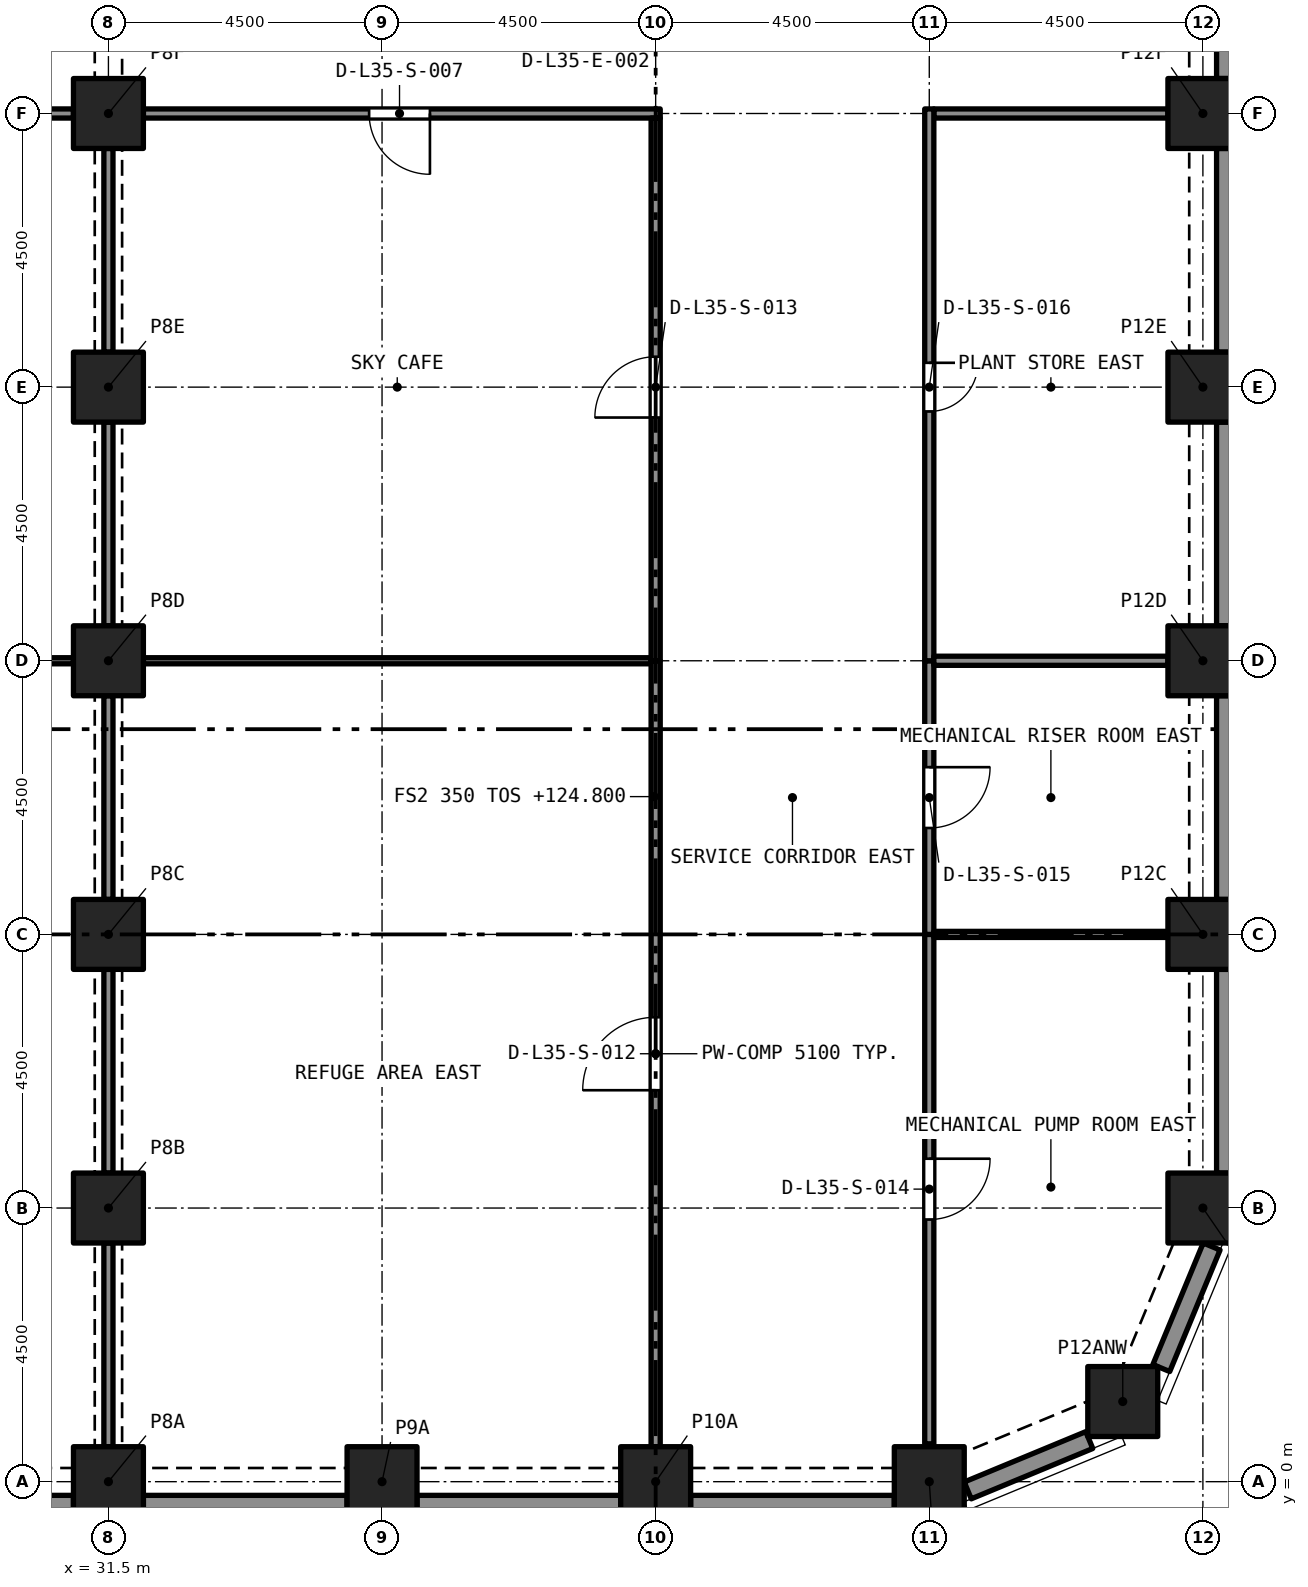
"""IFC4 building model, lengths in metres.
Left out: names, types, materials, properties, quantities, classifications, styles, units other than length and angle.
Written with IfcOpenShell. Run it as: python <this file> out.ifc"""

import sys

from ifc_helpers import new_model, si_unit, direction, frame, frame_2d, origin, origin_2d, place, context, subcontext, project, spatial, rectangle, extrude, element, fill, save


model = new_model("IFC4")
c1 = context("Model", 3, precision=1e-05, world=origin(), true_north=direction((0.0, 1.0)))
c2 = subcontext(c1, "Body", "Model", "MODEL_VIEW")
j1 = project(units=[si_unit("LENGTHUNIT", "METRE"), si_unit("PLANEANGLEUNIT", "RADIAN")], contexts=[c1])
p1 = place(None, origin())
s1 = spatial("IfcSite", under=j1, at=p1, CompositionType="ELEMENT")
p2 = place(p1, origin())
s2 = spatial("IfcBuilding", under=s1, at=p2, CompositionType="ELEMENT")
p3 = place(p2, frame((0.0, 0.0, 124.8)))
s3 = spatial("IfcBuildingStorey", under=s2, at=p3, CompositionType="ELEMENT", Elevation=124.8)
for number, where, z_axis, x_axis in (
    (1, (31.5, 0.0, 0.0), (0.0, 0.0, 1.0), (1.0, 0.0, 0.0)),
    (2, (36.0, 0.0, 0.0), (0.0, 0.0, 1.0), (1.0, 0.0, 0.0)),
    (3, (40.5, 0.0, 0.0), (0.0, 0.0, 1.0), (1.0, 0.0, 0.0)),
    (4, (45.0, 0.0, 0.0), (0.0, 0.0, 1.0), (1.0, 0.0, 0.0)),
    (5, (48.182, 1.318, 0.0), (0.0, 0.0, 1.0), (1.0, 0.0, 0.0)),
    (6, (31.5, 4.5, 0.0), (0.0, 0.0, 1.0), (1.0, 0.0, 0.0)),
    (7, (49.5, 4.5, 0.0), (0.0, 0.0, 1.0), (1.0, 0.0, 0.0)),
    (8, (31.5, 9.0, 0.0), (0.0, 0.0, 1.0), (1.0, 0.0, 0.0)),
    (9, (49.5, 9.0, 0.0), (0.0, 0.0, 1.0), (1.0, 0.0, 0.0)),
    (10, (31.5, 13.5, 0.0), (0.0, 0.0, 1.0), (1.0, 0.0, 0.0)),
    (11, (49.5, 13.5, 0.0), (0.0, 0.0, 1.0), (1.0, 0.0, 0.0)),
    (12, (31.5, 18.0, 0.0), (0.0, 0.0, 1.0), (1.0, 0.0, 0.0)),
    (13, (49.5, 18.0, 0.0), (0.0, 0.0, 1.0), (1.0, 0.0, 0.0)),
    (14, (31.5, 22.5, 0.0), (0.0, 0.0, 1.0), (1.0, 0.0, 0.0)),
    (15, (49.5, 22.5, 0.0), (0.0, 0.0, 1.0), (1.0, 0.0, 0.0)),
):
    element("IfcColumn", number, at=place(p3, frame(where, z_axis=z_axis, x_axis=x_axis)), inside=s3, PredefinedType="COLUMN", context=c2, shape_type="SweptSolid", body=[
        extrude(rectangle(XDim=1.15, YDim=1.15, at=origin_2d()), origin(), (0.0, 0.0, 1.0), 5.4),
    ])
for number, where, z_axis, x_axis in (
    (16, (30.925, -0.375, 0.0), (0.0, 0.0, 1.0), (-1.0, 0.0, 0.0)),
    (17, (35.425, -0.375, 0.0), (0.0, 0.0, 1.0), (-1.0, 0.0, 0.0)),
    (18, (39.925, -0.375, 0.0), (0.0, 0.0, 1.0), (-1.0, 0.0, 0.0)),
    (19, (44.425, -0.375, 0.0), (0.0, 0.0, 1.0), (-1.0, 0.0, 0.0)),
):
    element("IfcWall", number, at=place(p3, frame(where, z_axis=z_axis, x_axis=x_axis)), inside=s3, PredefinedType="SOLIDWALL", context=c2, shape_type="SweptSolid", body=[
        extrude(rectangle(XDim=3.35, YDim=0.3, at=frame_2d((1.675, 0.0))), origin(), (0.0, 0.0, 1.0), 5.4),
    ])
for number, where, z_axis, x_axis in (
    (20, (47.631, 0.684, 0.0), (0.0, 0.0, 1.0), (-0.924, -0.383, 0.0)),
    (21, (49.644, 3.868, 0.0), (0.0, 0.0, 1.0), (-0.383, -0.924, 0.0)),
):
    element("IfcWall", number, at=place(p3, frame(where, z_axis=z_axis, x_axis=x_axis)), inside=s3, PredefinedType="SOLIDWALL", context=c2, shape_type="SweptSolid", body=[
        extrude(rectangle(XDim=2.164, YDim=0.3, at=frame_2d((1.082, 0.0))), origin(), (0.0, 0.0, 1.0), 5.4),
    ])
for number, where, z_axis, x_axis in (
    (22, (49.875, 8.425, 0.0), (0.0, 0.0, 1.0), (0.0, -1.0, 0.0)),
    (23, (49.875, 12.925, 0.0), (0.0, 0.0, 1.0), (0.0, -1.0, 0.0)),
    (24, (49.875, 17.425, 0.0), (0.0, 0.0, 1.0), (0.0, -1.0, 0.0)),
    (25, (49.875, 21.925, 0.0), (0.0, 0.0, 1.0), (0.0, -1.0, 0.0)),
    (26, (49.875, 26.425, 0.0), (0.0, 0.0, 1.0), (0.0, -1.0, 0.0)),
):
    element("IfcWall", number, at=place(p3, frame(where, z_axis=z_axis, x_axis=x_axis)), inside=s3, PredefinedType="SOLIDWALL", context=c2, shape_type="SweptSolid", body=[
        extrude(rectangle(XDim=3.35, YDim=0.3, at=frame_2d((1.675, 0.0))), origin(), (0.0, 0.0, 1.0), 5.4),
    ])
p4 = place(p3, frame((30.925, 22.5, 0.0), z_axis=(0.0, 0.0, 1.0), x_axis=(-1.0, 0.0, 0.0)))
e27 = element("IfcWall", 27, at=p4, inside=s3, PredefinedType="PARTITIONING", context=c2, shape_type="SweptSolid", body=[
    extrude(rectangle(XDim=12.35, YDim=0.15, at=frame_2d((6.175, 0.0))), origin(), (0.0, 0.0, 1.0), 4.95),
])
p5 = place(p4, frame((5.425, 0.0, 0.0)))
e28 = element("IfcOpeningElement", 28, at=p5, cuts=e27, PredefinedType="OPENING", context=c2, shape_type="SweptSolid", body=[
    extrude(rectangle(XDim=1.5, YDim=2.4, at=frame_2d((0.75, 1.2))), frame((0.0, 0.085, 0.0), z_axis=(0.0, -1.0, 0.0), x_axis=(1.0, 0.0, 0.0)), (0.0, 0.0, 1.0), 0.17),
])
p6 = place(p3, frame((30.925, 13.5, 0.0), z_axis=(0.0, 0.0, 1.0), x_axis=(-1.0, 0.0, 0.0)))
e29 = element("IfcWall", 29, at=p6, inside=s3, PredefinedType="PARTITIONING", context=c2, shape_type="SweptSolid", body=[
    extrude(rectangle(XDim=12.35, YDim=0.1, at=frame_2d((6.175, 0.0))), origin(), (0.0, 0.0, 1.0), 4.95),
])
p7 = place(p6, frame((5.425, 0.0, 0.0)))
e30 = element("IfcOpeningElement", 30, at=p7, cuts=e29, PredefinedType="OPENING", context=c2, shape_type="SweptSolid", body=[
    extrude(rectangle(XDim=1.5, YDim=2.4, at=frame_2d((0.75, 1.2))), frame((0.0, 0.06, 0.0), z_axis=(0.0, -1.0, 0.0), x_axis=(1.0, 0.0, 0.0)), (0.0, 0.0, 1.0), 0.12),
])
for number, where, z_axis, x_axis in (
    (31, (31.5, 9.575, 0.0), (0.0, 0.0, 1.0), (0.0, 1.0, 0.0)),
    (32, (31.5, 5.075, 0.0), (0.0, 0.0, 1.0), (0.0, 1.0, 0.0)),
    (33, (31.5, 0.575, 0.0), (0.0, 0.0, 1.0), (0.0, 1.0, 0.0)),
    (34, (31.5, 18.575, 0.0), (0.0, 0.0, 1.0), (0.0, 1.0, 0.0)),
    (35, (31.5, 14.075, 0.0), (0.0, 0.0, 1.0), (0.0, 1.0, 0.0)),
):
    element("IfcWall", number, at=place(p3, frame(where, z_axis=z_axis, x_axis=x_axis)), inside=s3, PredefinedType="PARTITIONING", context=c2, shape_type="SweptSolid", body=[
        extrude(rectangle(XDim=3.35, YDim=0.15, at=frame_2d((1.675, 0.0))), origin(), (0.0, 0.0, 1.0), 4.58),
    ])
p8 = place(p3, frame((40.575, 22.5, 0.0), z_axis=(0.0, 0.0, 1.0), x_axis=(-1.0, 0.0, 0.0)))
e36 = element("IfcWall", 36, at=p8, inside=s3, PredefinedType="PARTITIONING", context=c2, shape_type="SweptSolid", body=[
    extrude(rectangle(XDim=8.5, YDim=0.15, at=frame_2d((4.25, 0.0))), origin(), (0.0, 0.0, 1.0), 5.1),
])
p9 = place(p8, frame((3.788, 0.0, 0.0)))
e37 = element("IfcOpeningElement", 37, at=p9, cuts=e36, PredefinedType="OPENING", context=c2, shape_type="SweptSolid", body=[
    extrude(rectangle(XDim=1.0, YDim=2.1, at=frame_2d((0.5, 1.05))), frame((0.0, 0.085, 0.0), z_axis=(0.0, -1.0, 0.0), x_axis=(1.0, 0.0, 0.0)), (0.0, 0.0, 1.0), 0.17),
])
p10 = place(p3, frame((45.075, 22.5, 0.0), z_axis=(0.0, 0.0, 1.0), x_axis=(1.0, 0.0, 0.0)))
e38 = element("IfcWall", 38, at=p10, inside=s3, PredefinedType="PARTITIONING", context=c2, shape_type="SweptSolid", body=[
    extrude(rectangle(XDim=3.85, YDim=0.15, at=frame_2d((1.925, 0.0))), origin(), (0.0, 0.0, 1.0), 5.1),
])
p11 = place(p3, frame((32.075, 13.5, 0.0), z_axis=(0.0, 0.0, 1.0), x_axis=(1.0, 0.0, 0.0)))
e39 = element("IfcWall", 39, at=p11, inside=s3, PredefinedType="PARTITIONING", context=c2, shape_type="SweptSolid", body=[
    extrude(rectangle(XDim=8.35, YDim=0.1, at=frame_2d((4.175, 0.0))), origin(), (0.0, 0.0, 1.0), 5.1),
])
p12 = place(p3, frame((40.5, 0.575, 0.0), z_axis=(0.0, 0.0, 1.0), x_axis=(0.0, 1.0, 0.0)))
e40 = element("IfcWall", 40, at=p12, inside=s3, PredefinedType="PARTITIONING", context=c2, shape_type="SweptSolid", body=[
    extrude(rectangle(XDim=12.925, YDim=0.15, at=frame_2d((6.462, 0.0))), origin(), (0.0, 0.0, 1.0), 5.1),
])
p13 = place(p12, frame((5.863, 0.0, 0.0)))
e41 = element("IfcOpeningElement", 41, at=p13, cuts=e40, PredefinedType="OPENING", context=c2, shape_type="SweptSolid", body=[
    extrude(rectangle(XDim=1.2, YDim=2.1, at=frame_2d((0.6, 1.05))), frame((0.0, 0.085, 0.0), z_axis=(0.0, -1.0, 0.0), x_axis=(1.0, 0.0, 0.0)), (0.0, 0.0, 1.0), 0.17),
])
p14 = place(p3, frame((40.5, 13.5, 0.0), z_axis=(0.0, 0.0, 1.0), x_axis=(0.0, 1.0, 0.0)))
e42 = element("IfcWall", 42, at=p14, inside=s3, PredefinedType="PARTITIONING", context=c2, shape_type="SweptSolid", body=[
    extrude(rectangle(XDim=8.925, YDim=0.15, at=frame_2d((4.462, 0.0))), origin(), (0.0, 0.0, 1.0), 5.1),
])
p15 = place(p14, frame((4.0, 0.0, 0.0)))
e43 = element("IfcOpeningElement", 43, at=p15, cuts=e42, PredefinedType="OPENING", context=c2, shape_type="SweptSolid", body=[
    extrude(rectangle(XDim=1.0, YDim=2.1, at=frame_2d((0.5, 1.05))), frame((0.0, 0.085, 0.0), z_axis=(0.0, -1.0, 0.0), x_axis=(1.0, 0.0, 0.0)), (0.0, 0.0, 1.0), 0.17),
])
p16 = place(p3, frame((45.0, 9.0, 0.0), z_axis=(0.0, 0.0, 1.0), x_axis=(0.0, -1.0, 0.0)))
e44 = element("IfcWall", 44, at=p16, inside=s3, PredefinedType="PARTITIONING", context=c2, shape_type="SweptSolid", body=[
    extrude(rectangle(XDim=8.378, YDim=0.15, at=frame_2d((4.189, 0.0))), origin(), (0.0, 0.0, 1.0), 5.1),
])
p17 = place(p16, frame((3.689, 0.0, 0.0)))
e45 = element("IfcOpeningElement", 45, at=p17, cuts=e44, PredefinedType="OPENING", context=c2, shape_type="SweptSolid", body=[
    extrude(rectangle(XDim=1.0, YDim=2.1, at=frame_2d((0.5, 1.05))), frame((0.0, 0.085, 0.0), z_axis=(0.0, -1.0, 0.0), x_axis=(1.0, 0.0, 0.0)), (0.0, 0.0, 1.0), 0.17),
])
p18 = place(p3, frame((45.0, 13.5, 0.0), z_axis=(0.0, 0.0, 1.0), x_axis=(0.0, -1.0, 0.0)))
e46 = element("IfcWall", 46, at=p18, inside=s3, PredefinedType="PARTITIONING", context=c2, shape_type="SweptSolid", body=[
    extrude(rectangle(XDim=4.5, YDim=0.15, at=frame_2d((2.25, 0.0))), origin(), (0.0, 0.0, 1.0), 5.1),
])
p19 = place(p18, frame((1.75, 0.0, 0.0)))
e47 = element("IfcOpeningElement", 47, at=p19, cuts=e46, PredefinedType="OPENING", context=c2, shape_type="SweptSolid", body=[
    extrude(rectangle(XDim=1.0, YDim=2.1, at=frame_2d((0.5, 1.05))), frame((0.0, 0.085, 0.0), z_axis=(0.0, -1.0, 0.0), x_axis=(1.0, 0.0, 0.0)), (0.0, 0.0, 1.0), 0.17),
])
p20 = place(p3, frame((45.0, 22.575, 0.0), z_axis=(0.0, 0.0, 1.0), x_axis=(0.0, -1.0, 0.0)))
e48 = element("IfcWall", 48, at=p20, inside=s3, PredefinedType="PARTITIONING", context=c2, shape_type="SweptSolid", body=[
    extrude(rectangle(XDim=9.075, YDim=0.15, at=frame_2d((4.538, 0.0))), origin(), (0.0, 0.0, 1.0), 5.1),
])
p21 = place(p20, frame((4.175, 0.0, 0.0)))
e49 = element("IfcOpeningElement", 49, at=p21, cuts=e48, PredefinedType="OPENING", context=c2, shape_type="SweptSolid", body=[
    extrude(rectangle(XDim=0.8, YDim=2.1, at=frame_2d((0.4, 1.05))), frame((0.0, 0.085, 0.0), z_axis=(0.0, -1.0, 0.0), x_axis=(1.0, 0.0, 0.0)), (0.0, 0.0, 1.0), 0.17),
])
p22 = place(p3, frame((45.075, 9.0, 0.0), z_axis=(0.0, 0.0, 1.0), x_axis=(1.0, 0.0, 0.0)))
e50 = element("IfcWall", 50, at=p22, inside=s3, PredefinedType="PARTITIONING", context=c2, shape_type="SweptSolid", body=[
    extrude(rectangle(XDim=3.85, YDim=0.1, at=frame_2d((1.925, 0.0))), origin(), (0.0, 0.0, 1.0), 5.1),
])
p23 = place(p3, frame((45.075, 13.5, 0.0), z_axis=(0.0, 0.0, 1.0), x_axis=(1.0, 0.0, 0.0)))
e51 = element("IfcWall", 51, at=p23, inside=s3, PredefinedType="PARTITIONING", context=c2, shape_type="SweptSolid", body=[
    extrude(rectangle(XDim=3.85, YDim=0.15, at=frame_2d((1.925, 0.0))), origin(), (0.0, 0.0, 1.0), 5.1),
])
p24 = place(p9, origin())
e52 = element("IfcDoor", 52, at=p24, inside=s3, OperationType="SINGLE_SWING_RIGHT", PredefinedType="DOOR", context=c2, shape_type="SweptSolid", body=[
    extrude(rectangle(XDim=1.0, YDim=2.1, at=frame_2d((0.5, 1.05))), frame((0.0, 0.025, 0.0), z_axis=(0.0, -1.0, 0.0), x_axis=(1.0, 0.0, 0.0)), (0.0, 0.0, 1.0), 0.05),
])
fill(e37, e52)
p25 = place(p13, origin())
e53 = element("IfcDoor", 53, at=p25, inside=s3, OperationType="SINGLE_SWING_RIGHT", PredefinedType="DOOR", context=c2, shape_type="SweptSolid", body=[
    extrude(rectangle(XDim=1.2, YDim=2.1, at=frame_2d((0.6, 1.05))), frame((0.0, 0.025, 0.0), z_axis=(0.0, -1.0, 0.0), x_axis=(1.0, 0.0, 0.0)), (0.0, 0.0, 1.0), 0.05),
])
fill(e41, e53)
p26 = place(p15, origin())
e54 = element("IfcDoor", 54, at=p26, inside=s3, OperationType="SINGLE_SWING_RIGHT", PredefinedType="DOOR", context=c2, shape_type="SweptSolid", body=[
    extrude(rectangle(XDim=1.0, YDim=2.1, at=frame_2d((0.5, 1.05))), frame((0.0, 0.025, 0.0), z_axis=(0.0, -1.0, 0.0), x_axis=(1.0, 0.0, 0.0)), (0.0, 0.0, 1.0), 0.05),
])
fill(e43, e54)
p27 = place(p17, origin())
e55 = element("IfcDoor", 55, at=p27, inside=s3, OperationType="SINGLE_SWING_RIGHT", PredefinedType="DOOR", context=c2, shape_type="SweptSolid", body=[
    extrude(rectangle(XDim=1.0, YDim=2.1, at=frame_2d((0.5, 1.05))), frame((0.0, 0.025, 0.0), z_axis=(0.0, -1.0, 0.0), x_axis=(1.0, 0.0, 0.0)), (0.0, 0.0, 1.0), 0.05),
])
fill(e45, e55)
p28 = place(p19, origin())
e56 = element("IfcDoor", 56, at=p28, inside=s3, OperationType="SINGLE_SWING_RIGHT", PredefinedType="DOOR", context=c2, shape_type="SweptSolid", body=[
    extrude(rectangle(XDim=1.0, YDim=2.1, at=frame_2d((0.5, 1.05))), frame((0.0, 0.025, 0.0), z_axis=(0.0, -1.0, 0.0), x_axis=(1.0, 0.0, 0.0)), (0.0, 0.0, 1.0), 0.05),
])
fill(e47, e56)
p29 = place(p21, origin())
e57 = element("IfcDoor", 57, at=p29, inside=s3, OperationType="SINGLE_SWING_RIGHT", PredefinedType="DOOR", context=c2, shape_type="SweptSolid", body=[
    extrude(rectangle(XDim=0.8, YDim=2.1, at=frame_2d((0.4, 1.05))), frame((0.0, 0.025, 0.0), z_axis=(0.0, -1.0, 0.0), x_axis=(1.0, 0.0, 0.0)), (0.0, 0.0, 1.0), 0.05),
])
fill(e49, e57)
save(model, sys.argv[1])
